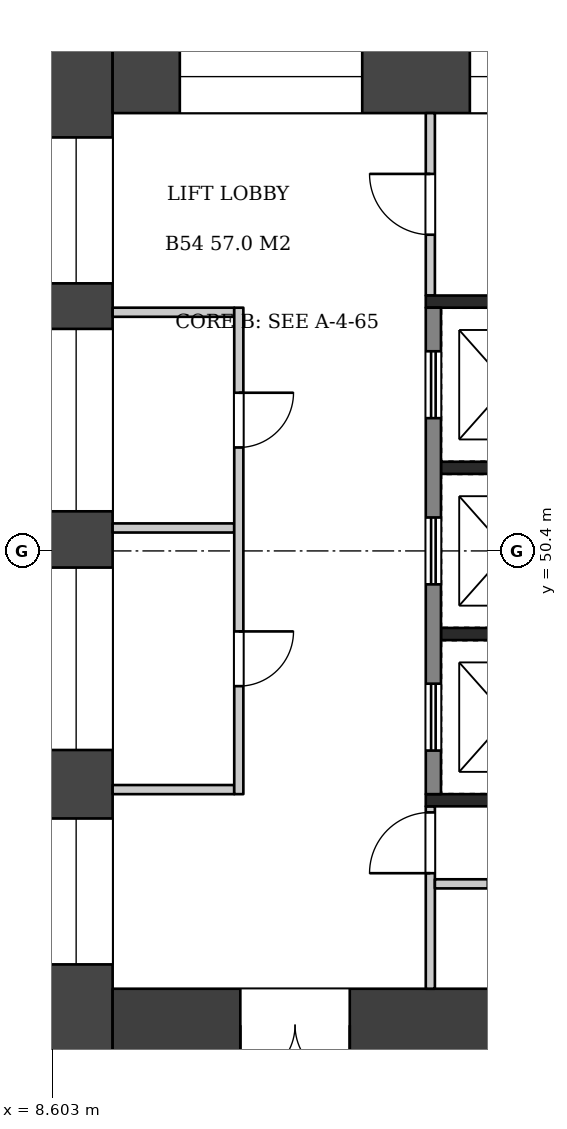
"""IFC4 building model, lengths in metres.
Left out: names, types, materials, properties, quantities, classifications, styles, units other than length and angle.
Written with IfcOpenShell. Run it as: python <this file> out.ifc"""

import sys

from ifc_helpers import new_model, si_unit, direction, frame, frame_2d, origin, place, context, subcontext, project, spatial, rectangle, extrude, element, fill, save


model = new_model("IFC4")
c1 = context("Model", 3, precision=1e-05, world=origin(), true_north=direction((0.0, 1.0)))
c2 = subcontext(c1, "Body", "Model", "MODEL_VIEW")
j1 = project(units=[si_unit("LENGTHUNIT", "METRE"), si_unit("PLANEANGLEUNIT", "RADIAN")], contexts=[c1])
p1 = place(None, origin())
s1 = spatial("IfcSite", under=j1, at=p1, CompositionType="ELEMENT")
p2 = place(p1, origin())
s2 = spatial("IfcBuilding", under=s1, at=p2, CompositionType="ELEMENT")
p3 = place(p2, frame((0.0, 0.0, 207.2)))
s3 = spatial("IfcBuildingStorey", under=s2, at=p3, CompositionType="ELEMENT", Elevation=207.2)
p4 = place(p3, frame((9.0, 58.8, 0.0), z_axis=(0.0, 0.0, 1.0), x_axis=(0.0, -1.0, 0.0)))
e1 = element("IfcWall", 1, at=p4, inside=s3, PredefinedType="SHEAR", context=c2, shape_type="SweptSolid", body=[
    extrude(rectangle(XDim=16.8, YDim=1.2, at=frame_2d((8.4, 0.0))), origin(), (0.0, 0.0, 1.0), 6.72),
])
p5 = place(p4, frame((1.6, 0.0, 0.6)))
e2 = element("IfcOpeningElement", 2, at=p5, cuts=e1, PredefinedType="OPENING", context=c2, shape_type="SweptSolid", body=[
    extrude(rectangle(XDim=2.4, YDim=2.1, at=frame_2d((1.2, 1.05))), frame((0.0, 0.61, 0.0), z_axis=(0.0, -1.0, 0.0), x_axis=(1.0, 0.0, 0.0)), (0.0, 0.0, 1.0), 1.22),
])
p6 = place(p4, frame((4.749, 0.0, 1.6)))
e3 = element("IfcOpeningElement", 3, at=p6, cuts=e1, PredefinedType="OPENING", context=c2, shape_type="SweptSolid", body=[
    extrude(rectangle(XDim=3.0, YDim=1.2, at=frame_2d((1.5, 0.6))), frame((0.0, 0.61, 0.0), z_axis=(0.0, -1.0, 0.0), x_axis=(1.0, 0.0, 0.0)), (0.0, 0.0, 1.0), 1.22),
])
p7 = place(p4, frame((8.674, 0.0, 1.6)))
e4 = element("IfcOpeningElement", 4, at=p7, cuts=e1, PredefinedType="OPENING", context=c2, shape_type="SweptSolid", body=[
    extrude(rectangle(XDim=3.0, YDim=1.2, at=frame_2d((1.5, 0.6))), frame((0.0, 0.61, 0.0), z_axis=(0.0, -1.0, 0.0), x_axis=(1.0, 0.0, 0.0)), (0.0, 0.0, 1.0), 1.22),
])
p8 = place(p4, frame((12.8, 0.0, 0.6)))
e5 = element("IfcOpeningElement", 5, at=p8, cuts=e1, PredefinedType="OPENING", context=c2, shape_type="SweptSolid", body=[
    extrude(rectangle(XDim=2.4, YDim=2.1, at=frame_2d((1.2, 1.05))), frame((0.0, 0.61, 0.0), z_axis=(0.0, -1.0, 0.0), x_axis=(1.0, 0.0, 0.0)), (0.0, 0.0, 1.0), 1.22),
])
p9 = place(p3, frame((9.6, 58.2, 0.0), z_axis=(0.0, 0.0, 1.0), x_axis=(1.0, 0.0, 0.0)))
e6 = element("IfcWall", 6, at=p9, inside=s3, PredefinedType="SHEAR", context=c2, shape_type="SweptSolid", body=[
    extrude(rectangle(XDim=14.4, YDim=1.2, at=frame_2d((7.2, 0.0))), origin(), (0.0, 0.0, 1.0), 6.72),
])
p10 = place(p9, frame((1.105, 0.0, 0.6)))
e7 = element("IfcOpeningElement", 7, at=p10, cuts=e6, PredefinedType="OPENING", context=c2, shape_type="SweptSolid", body=[
    extrude(rectangle(XDim=3.0, YDim=2.1, at=frame_2d((1.5, 1.05))), frame((0.0, 0.61, 0.0), z_axis=(0.0, -1.0, 0.0), x_axis=(1.0, 0.0, 0.0)), (0.0, 0.0, 1.0), 1.22),
])
p11 = place(p9, frame((5.875, 0.0, 0.6)))
e8 = element("IfcOpeningElement", 8, at=p11, cuts=e6, PredefinedType="OPENING", context=c2, shape_type="SweptSolid", body=[
    extrude(rectangle(XDim=2.4, YDim=2.1, at=frame_2d((1.2, 1.05))), frame((0.0, 0.61, 0.0), z_axis=(0.0, -1.0, 0.0), x_axis=(1.0, 0.0, 0.0)), (0.0, 0.0, 1.0), 1.22),
])
p12 = place(p9, frame((9.993, 0.0, 0.5)))
e9 = element("IfcOpeningElement", 9, at=p12, cuts=e6, PredefinedType="OPENING", context=c2, shape_type="SweptSolid", body=[
    extrude(rectangle(XDim=1.2, YDim=2.4, at=frame_2d((0.6, 1.2))), frame((0.0, 0.61, 0.0), z_axis=(0.0, -1.0, 0.0), x_axis=(1.0, 0.0, 0.0)), (0.0, 0.0, 1.0), 1.22),
])
p13 = place(p9, frame((12.197, 0.0, 0.5)))
e10 = element("IfcOpeningElement", 10, at=p13, cuts=e6, PredefinedType="OPENING", context=c2, shape_type="SweptSolid", body=[
    extrude(rectangle(XDim=1.2, YDim=2.4, at=frame_2d((0.6, 1.2))), frame((0.0, 0.61, 0.0), z_axis=(0.0, -1.0, 0.0), x_axis=(1.0, 0.0, 0.0)), (0.0, 0.0, 1.0), 1.22),
])
p14 = place(p3, frame((9.6, 42.6, 0.0), z_axis=(0.0, 0.0, 1.0), x_axis=(1.0, 0.0, 0.0)))
e11 = element("IfcWall", 11, at=p14, inside=s3, PredefinedType="SHEAR", context=c2, shape_type="SweptSolid", body=[
    extrude(rectangle(XDim=14.4, YDim=1.2, at=frame_2d((7.2, 0.0))), origin(), (0.0, 0.0, 1.0), 6.72),
])
p15 = place(p14, frame((2.1, 0.0, 0.0)))
e12 = element("IfcOpeningElement", 12, at=p15, cuts=e11, PredefinedType="OPENING", context=c2, shape_type="SweptSolid", body=[
    extrude(rectangle(XDim=1.8, YDim=2.1, at=frame_2d((0.9, 1.05))), frame((0.0, 0.61, 0.0), z_axis=(0.0, -1.0, 0.0), x_axis=(1.0, 0.0, 0.0)), (0.0, 0.0, 1.0), 1.22),
])
for number, where, z_axis, x_axis in (
    (13, (9.6, 54.325, 0.0), (0.0, 0.0, 1.0), (1.0, 0.0, 0.0)),
    (14, (9.6, 46.475, 0.0), (0.0, 0.0, 1.0), (1.0, 0.0, 0.0)),
    (15, (9.6, 50.778, 0.0), (0.0, 0.0, 1.0), (1.0, 0.0, 0.0)),
):
    element("IfcWall", number, at=place(p3, frame(where, z_axis=z_axis, x_axis=x_axis)), inside=s3, PredefinedType="PARTITIONING", context=c2, shape_type="SweptSolid", body=[
        extrude(rectangle(XDim=2.0, YDim=0.15, at=frame_2d((1.0, 0.0))), origin(), (0.0, 0.0, 1.0), 6.72),
    ])
p16 = place(p3, frame((11.675, 54.4, 0.0), z_axis=(0.0, 0.0, 1.0), x_axis=(0.0, -1.0, 0.0)))
e16 = element("IfcWall", 16, at=p16, inside=s3, PredefinedType="PARTITIONING", context=c2, shape_type="SweptSolid", body=[
    extrude(rectangle(XDim=8.0, YDim=0.15, at=frame_2d((4.0, 0.0))), origin(), (0.0, 0.0, 1.0), 6.72),
])
p17 = place(p16, frame((1.399, 0.0, 0.0)))
e17 = element("IfcOpeningElement", 17, at=p17, cuts=e16, PredefinedType="OPENING", context=c2, shape_type="SweptSolid", body=[
    extrude(rectangle(XDim=0.9, YDim=2.1, at=frame_2d((0.45, 1.05))), frame((0.0, 0.085, 0.0), z_axis=(0.0, -1.0, 0.0), x_axis=(1.0, 0.0, 0.0)), (0.0, 0.0, 1.0), 0.17),
])
p18 = place(p16, frame((5.324, 0.0, 0.0)))
e18 = element("IfcOpeningElement", 18, at=p18, cuts=e16, PredefinedType="OPENING", context=c2, shape_type="SweptSolid", body=[
    extrude(rectangle(XDim=0.9, YDim=2.1, at=frame_2d((0.45, 1.05))), frame((0.0, 0.085, 0.0), z_axis=(0.0, -1.0, 0.0), x_axis=(1.0, 0.0, 0.0)), (0.0, 0.0, 1.0), 0.17),
])
for number, where, z_axis, x_axis in (
    (19, (15.0, 51.767, 0.0), (0.0, 0.0, 1.0), (1.0, 0.0, 0.0)),
    (20, (15.0, 49.033, 0.0), (0.0, 0.0, 1.0), (1.0, 0.0, 0.0)),
):
    element("IfcWall", number, at=place(p3, frame(where, z_axis=z_axis, x_axis=x_axis)), inside=s3, PredefinedType="SHEAR", context=c2, shape_type="SweptSolid", body=[
        extrude(rectangle(XDim=1.9, YDim=0.2, at=frame_2d((0.95, 0.0))), origin(), (0.0, 0.0, 1.0), 6.72),
    ])
p19 = place(p3, frame((14.875, 54.4, 0.0), z_axis=(0.0, 0.0, 1.0), x_axis=(0.0, -1.0, 0.0)))
e21 = element("IfcWall", 21, at=p19, inside=s3, PredefinedType="SHEAR", context=c2, shape_type="SweptSolid", body=[
    extrude(rectangle(XDim=8.0, YDim=0.25, at=frame_2d((4.0, 0.0))), origin(), (0.0, 0.0, 1.0), 6.72),
])
p20 = place(p19, frame((0.717, 0.0, 0.0)))
e22 = element("IfcOpeningElement", 22, at=p20, cuts=e21, PredefinedType="OPENING", context=c2, shape_type="SweptSolid", body=[
    extrude(rectangle(XDim=1.1, YDim=2.1, at=frame_2d((0.55, 1.05))), frame((0.0, 0.135, 0.0), z_axis=(0.0, -1.0, 0.0), x_axis=(1.0, 0.0, 0.0)), (0.0, 0.0, 1.0), 0.27),
])
p21 = place(p19, frame((3.45, 0.0, 0.0)))
e23 = element("IfcOpeningElement", 23, at=p21, cuts=e21, PredefinedType="OPENING", context=c2, shape_type="SweptSolid", body=[
    extrude(rectangle(XDim=1.1, YDim=2.1, at=frame_2d((0.55, 1.05))), frame((0.0, 0.135, 0.0), z_axis=(0.0, -1.0, 0.0), x_axis=(1.0, 0.0, 0.0)), (0.0, 0.0, 1.0), 0.27),
])
p22 = place(p19, frame((6.183, 0.0, 0.0)))
e24 = element("IfcOpeningElement", 24, at=p22, cuts=e21, PredefinedType="OPENING", context=c2, shape_type="SweptSolid", body=[
    extrude(rectangle(XDim=1.1, YDim=2.1, at=frame_2d((0.55, 1.05))), frame((0.0, 0.135, 0.0), z_axis=(0.0, -1.0, 0.0), x_axis=(1.0, 0.0, 0.0)), (0.0, 0.0, 1.0), 0.27),
])
p23 = place(p3, frame((14.75, 54.5, 0.0), z_axis=(0.0, 0.0, 1.0), x_axis=(1.0, 0.0, 0.0)))
e25 = element("IfcWall", 25, at=p23, inside=s3, PredefinedType="SHEAR", context=c2, shape_type="SweptSolid", body=[
    extrude(rectangle(XDim=2.4, YDim=0.2, at=frame_2d((1.2, 0.0))), origin(), (0.0, 0.0, 1.0), 6.72),
])
p24 = place(p3, frame((14.825, 57.6, 0.0), z_axis=(0.0, 0.0, 1.0), x_axis=(0.0, -1.0, 0.0)))
e26 = element("IfcWall", 26, at=p24, inside=s3, PredefinedType="PARTITIONING", context=c2, shape_type="SweptSolid", body=[
    extrude(rectangle(XDim=3.0, YDim=0.15, at=frame_2d((1.5, 0.0))), origin(), (0.0, 0.0, 1.0), 6.72),
])
p25 = place(p24, frame((1.0, 0.0, 0.0)))
e27 = element("IfcOpeningElement", 27, at=p25, cuts=e26, PredefinedType="OPENING", context=c2, shape_type="SweptSolid", body=[
    extrude(rectangle(XDim=1.0, YDim=2.1, at=frame_2d((0.5, 1.05))), frame((0.0, 0.085, 0.0), z_axis=(0.0, -1.0, 0.0), x_axis=(1.0, 0.0, 0.0)), (0.0, 0.0, 1.0), 0.17),
])
p26 = place(p3, frame((14.75, 46.3, 0.0), z_axis=(0.0, 0.0, 1.0), x_axis=(1.0, 0.0, 0.0)))
e28 = element("IfcWall", 28, at=p26, inside=s3, PredefinedType="SHEAR", context=c2, shape_type="SweptSolid", body=[
    extrude(rectangle(XDim=9.25, YDim=0.2, at=frame_2d((4.625, 0.0))), origin(), (0.0, 0.0, 1.0), 6.72),
])
p27 = place(p3, frame((14.825, 46.2, 0.0), z_axis=(0.0, 0.0, 1.0), x_axis=(0.0, -1.0, 0.0)))
e29 = element("IfcWall", 29, at=p27, inside=s3, PredefinedType="PARTITIONING", context=c2, shape_type="SweptSolid", body=[
    extrude(rectangle(XDim=3.0, YDim=0.15, at=frame_2d((1.5, 0.0))), origin(), (0.0, 0.0, 1.0), 6.72),
])
p28 = place(p27, frame((0.1, 0.0, 0.0)))
e30 = element("IfcOpeningElement", 30, at=p28, cuts=e29, PredefinedType="OPENING", context=c2, shape_type="SweptSolid", body=[
    extrude(rectangle(XDim=1.0, YDim=2.1, at=frame_2d((0.5, 1.05))), frame((0.0, 0.085, 0.0), z_axis=(0.0, -1.0, 0.0), x_axis=(1.0, 0.0, 0.0)), (0.0, 0.0, 1.0), 0.17),
])
p29 = place(p3, frame((14.9, 44.925, 0.0), z_axis=(0.0, 0.0, 1.0), x_axis=(1.0, 0.0, 0.0)))
e31 = element("IfcWall", 31, at=p29, inside=s3, PredefinedType="PARTITIONING", context=c2, shape_type="SweptSolid", body=[
    extrude(rectangle(XDim=9.1, YDim=0.15, at=frame_2d((4.55, 0.0))), origin(), (0.0, 0.0, 1.0), 6.72),
])
p30 = place(p29, frame((0.87, 0.0, 0.0)))
e32 = element("IfcOpeningElement", 32, at=p30, cuts=e31, PredefinedType="OPENING", context=c2, shape_type="SweptSolid", body=[
    extrude(rectangle(XDim=0.9, YDim=2.1, at=frame_2d((0.45, 1.05))), frame((0.0, 0.085, 0.0), z_axis=(0.0, -1.0, 0.0), x_axis=(1.0, 0.0, 0.0)), (0.0, 0.0, 1.0), 0.17),
])
p31 = place(p29, frame((3.66, 0.0, 0.0)))
e33 = element("IfcOpeningElement", 33, at=p31, cuts=e31, PredefinedType="OPENING", context=c2, shape_type="SweptSolid", body=[
    extrude(rectangle(XDim=0.9, YDim=2.1, at=frame_2d((0.45, 1.05))), frame((0.0, 0.085, 0.0), z_axis=(0.0, -1.0, 0.0), x_axis=(1.0, 0.0, 0.0)), (0.0, 0.0, 1.0), 0.17),
])
p32 = place(p29, frame((6.89, 0.0, 0.0)))
e34 = element("IfcOpeningElement", 34, at=p32, cuts=e31, PredefinedType="OPENING", context=c2, shape_type="SweptSolid", body=[
    extrude(rectangle(XDim=0.9, YDim=2.1, at=frame_2d((0.45, 1.05))), frame((0.0, 0.085, 0.0), z_axis=(0.0, -1.0, 0.0), x_axis=(1.0, 0.0, 0.0)), (0.0, 0.0, 1.0), 0.17),
])
p33 = place(p15, frame((1.8, 0.0, 0.0), z_axis=(0.0, 0.0, 1.0), x_axis=(-1.0, 0.0, 0.0)))
e35 = element("IfcDoor", 35, at=p33, inside=s3, OperationType="DOUBLE_DOOR_SINGLE_SWING", PredefinedType="DOOR", context=c2, shape_type="SweptSolid", body=[
    extrude(rectangle(XDim=1.8, YDim=2.1, at=frame_2d((0.9, 1.05))), frame((0.0, 0.025, 0.0), z_axis=(0.0, -1.0, 0.0), x_axis=(1.0, 0.0, 0.0)), (0.0, 0.0, 1.0), 0.05),
])
fill(e12, e35)
p34 = place(p17, origin())
e36 = element("IfcDoor", 36, at=p34, inside=s3, OperationType="SINGLE_SWING_LEFT", PredefinedType="DOOR", context=c2, shape_type="SweptSolid", body=[
    extrude(rectangle(XDim=0.9, YDim=2.1, at=frame_2d((0.45, 1.05))), frame((0.0, 0.025, 0.0), z_axis=(0.0, -1.0, 0.0), x_axis=(1.0, 0.0, 0.0)), (0.0, 0.0, 1.0), 0.05),
])
fill(e17, e36)
p35 = place(p18, origin())
e37 = element("IfcDoor", 37, at=p35, inside=s3, OperationType="SINGLE_SWING_LEFT", PredefinedType="DOOR", context=c2, shape_type="SweptSolid", body=[
    extrude(rectangle(XDim=0.9, YDim=2.1, at=frame_2d((0.45, 1.05))), frame((0.0, 0.025, 0.0), z_axis=(0.0, -1.0, 0.0), x_axis=(1.0, 0.0, 0.0)), (0.0, 0.0, 1.0), 0.05),
])
fill(e18, e37)
p36 = place(p20, origin())
e38 = element("IfcDoor", 38, at=p36, inside=s3, OperationType="DOUBLE_DOOR_SLIDING", PredefinedType="DOOR", context=c2, shape_type="SweptSolid", body=[
    extrude(rectangle(XDim=1.1, YDim=2.1, at=frame_2d((0.55, 1.05))), frame((0.0, 0.025, 0.0), z_axis=(0.0, -1.0, 0.0), x_axis=(1.0, 0.0, 0.0)), (0.0, 0.0, 1.0), 0.05),
])
fill(e22, e38)
p37 = place(p21, origin())
e39 = element("IfcDoor", 39, at=p37, inside=s3, OperationType="DOUBLE_DOOR_SLIDING", PredefinedType="DOOR", context=c2, shape_type="SweptSolid", body=[
    extrude(rectangle(XDim=1.1, YDim=2.1, at=frame_2d((0.55, 1.05))), frame((0.0, 0.025, 0.0), z_axis=(0.0, -1.0, 0.0), x_axis=(1.0, 0.0, 0.0)), (0.0, 0.0, 1.0), 0.05),
])
fill(e23, e39)
p38 = place(p22, origin())
e40 = element("IfcDoor", 40, at=p38, inside=s3, OperationType="DOUBLE_DOOR_SLIDING", PredefinedType="DOOR", context=c2, shape_type="SweptSolid", body=[
    extrude(rectangle(XDim=1.1, YDim=2.1, at=frame_2d((0.55, 1.05))), frame((0.0, 0.025, 0.0), z_axis=(0.0, -1.0, 0.0), x_axis=(1.0, 0.0, 0.0)), (0.0, 0.0, 1.0), 0.05),
])
fill(e24, e40)
p39 = place(p25, frame((1.0, 0.0, 0.0), z_axis=(0.0, 0.0, 1.0), x_axis=(-1.0, 0.0, 0.0)))
e41 = element("IfcDoor", 41, at=p39, inside=s3, OperationType="SINGLE_SWING_RIGHT", PredefinedType="DOOR", context=c2, shape_type="SweptSolid", body=[
    extrude(rectangle(XDim=1.0, YDim=2.1, at=frame_2d((0.5, 1.05))), frame((0.0, 0.025, 0.0), z_axis=(0.0, -1.0, 0.0), x_axis=(1.0, 0.0, 0.0)), (0.0, 0.0, 1.0), 0.05),
])
fill(e27, e41)
p40 = place(p28, frame((1.0, 0.0, 0.0), z_axis=(0.0, 0.0, 1.0), x_axis=(-1.0, 0.0, 0.0)))
e42 = element("IfcDoor", 42, at=p40, inside=s3, OperationType="SINGLE_SWING_LEFT", PredefinedType="DOOR", context=c2, shape_type="SweptSolid", body=[
    extrude(rectangle(XDim=1.0, YDim=2.1, at=frame_2d((0.5, 1.05))), frame((0.0, 0.025, 0.0), z_axis=(0.0, -1.0, 0.0), x_axis=(1.0, 0.0, 0.0)), (0.0, 0.0, 1.0), 0.05),
])
fill(e30, e42)
p41 = place(p5, origin())
e43 = element("IfcWindow", 43, at=p41, inside=s3, PartitioningType="SINGLE_PANEL", PredefinedType="WINDOW", context=c2, shape_type="SweptSolid", body=[
    extrude(rectangle(XDim=2.4, YDim=2.1, at=frame_2d((1.2, 1.05))), frame((0.0, 0.03, 0.0), z_axis=(0.0, -1.0, 0.0), x_axis=(1.0, 0.0, 0.0)), (0.0, 0.0, 1.0), 0.06),
])
fill(e2, e43)
p42 = place(p6, origin())
e44 = element("IfcWindow", 44, at=p42, inside=s3, PartitioningType="SINGLE_PANEL", PredefinedType="WINDOW", context=c2, shape_type="SweptSolid", body=[
    extrude(rectangle(XDim=3.0, YDim=1.2, at=frame_2d((1.5, 0.6))), frame((0.0, 0.03, 0.0), z_axis=(0.0, -1.0, 0.0), x_axis=(1.0, 0.0, 0.0)), (0.0, 0.0, 1.0), 0.06),
])
fill(e3, e44)
p43 = place(p7, origin())
e45 = element("IfcWindow", 45, at=p43, inside=s3, PartitioningType="SINGLE_PANEL", PredefinedType="WINDOW", context=c2, shape_type="SweptSolid", body=[
    extrude(rectangle(XDim=3.0, YDim=1.2, at=frame_2d((1.5, 0.6))), frame((0.0, 0.03, 0.0), z_axis=(0.0, -1.0, 0.0), x_axis=(1.0, 0.0, 0.0)), (0.0, 0.0, 1.0), 0.06),
])
fill(e4, e45)
p44 = place(p8, origin())
e46 = element("IfcWindow", 46, at=p44, inside=s3, PartitioningType="SINGLE_PANEL", PredefinedType="WINDOW", context=c2, shape_type="SweptSolid", body=[
    extrude(rectangle(XDim=2.4, YDim=2.1, at=frame_2d((1.2, 1.05))), frame((0.0, 0.03, 0.0), z_axis=(0.0, -1.0, 0.0), x_axis=(1.0, 0.0, 0.0)), (0.0, 0.0, 1.0), 0.06),
])
fill(e5, e46)
p45 = place(p10, origin())
e47 = element("IfcWindow", 47, at=p45, inside=s3, PartitioningType="SINGLE_PANEL", PredefinedType="WINDOW", context=c2, shape_type="SweptSolid", body=[
    extrude(rectangle(XDim=3.0, YDim=2.1, at=frame_2d((1.5, 1.05))), frame((0.0, 0.03, 0.0), z_axis=(0.0, -1.0, 0.0), x_axis=(1.0, 0.0, 0.0)), (0.0, 0.0, 1.0), 0.06),
])
fill(e7, e47)
p46 = place(p11, origin())
e48 = element("IfcWindow", 48, at=p46, inside=s3, PartitioningType="SINGLE_PANEL", PredefinedType="WINDOW", context=c2, shape_type="SweptSolid", body=[
    extrude(rectangle(XDim=2.4, YDim=2.1, at=frame_2d((1.2, 1.05))), frame((0.0, 0.03, 0.0), z_axis=(0.0, -1.0, 0.0), x_axis=(1.0, 0.0, 0.0)), (0.0, 0.0, 1.0), 0.06),
])
fill(e8, e48)
save(model, sys.argv[1])
